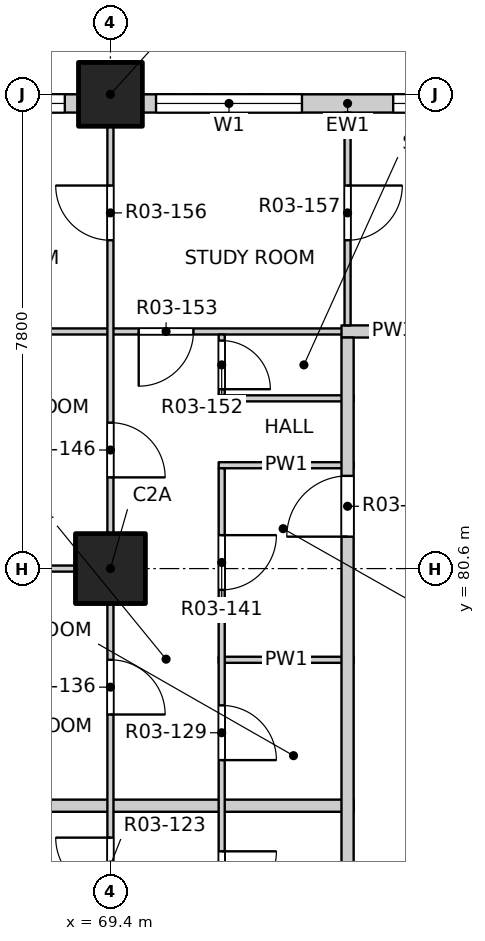
"""IFC4 building model, lengths in metres.
Left out: names, types, materials, properties, quantities, classifications, styles, units other than length and angle.
Written with IfcOpenShell. Run it as: python <this file> out.ifc"""

import sys

from ifc_helpers import new_model, si_unit, direction, frame, frame_2d, origin, origin_2d, place, context, subcontext, project, spatial, rectangle, extrude, element, fill, save


model = new_model("IFC4")
c1 = context("Model", 3, precision=1e-05, world=origin(), true_north=direction((0.0, 1.0)))
c2 = subcontext(c1, "Body", "Model", "MODEL_VIEW")
j1 = project(units=[si_unit("LENGTHUNIT", "METRE"), si_unit("PLANEANGLEUNIT", "RADIAN")], contexts=[c1])
p1 = place(None, origin())
s1 = spatial("IfcSite", under=j1, at=p1, CompositionType="ELEMENT")
p2 = place(p1, origin())
s2 = spatial("IfcBuilding", under=s1, at=p2, CompositionType="ELEMENT")
p3 = place(p2, frame((0.0, 0.0, 43.3)))
s3 = spatial("IfcBuildingStorey", under=s2, at=p3, CompositionType="ELEMENT", Elevation=43.3)
p4 = place(p3, frame((69.4, 88.4, -0.25), z_axis=(0.0, 0.0, 1.0), x_axis=(1.0, 0.0, 0.0)))
e1 = element("IfcColumn", 1, at=p4, inside=s3, PredefinedType="COLUMN", context=c2, shape_type="SweptSolid", body=[
    extrude(rectangle(XDim=1.05, YDim=1.05, at=origin_2d()), origin(), (0.0, 0.0, 1.0), 3.35),
])
p5 = place(p3, frame((69.4, 80.6, -0.25), z_axis=(0.0, 0.0, 1.0), x_axis=(1.0, 0.0, 0.0)))
e2 = element("IfcColumn", 2, at=p5, inside=s3, PredefinedType="COLUMN", context=c2, shape_type="SweptSolid", body=[
    extrude(rectangle(XDim=1.15, YDim=1.15, at=origin_2d()), origin(), (0.0, 0.0, 1.0), 3.35),
])
p6 = place(p3, frame((65.5, 88.25, 0.0), z_axis=(0.0, 0.0, 1.0), x_axis=(1.0, 0.0, 0.0)))
e3 = element("IfcWall", 3, at=p6, inside=s3, PredefinedType="SOLIDWALL", context=c2, shape_type="SweptSolid", body=[
    extrude(rectangle(XDim=3.375, YDim=0.3, at=frame_2d((1.688, 0.0))), origin(), (0.0, 0.0, 1.0), 3.1),
])
p7 = place(p6, frame((0.75, 0.0, 0.9)))
e4 = element("IfcOpeningElement", 4, at=p7, cuts=e3, PredefinedType="OPENING", context=c2, shape_type="SweptSolid", body=[
    extrude(rectangle(XDim=2.4, YDim=1.8, at=frame_2d((1.2, 0.9))), frame((0.0, 0.16, 0.0), z_axis=(0.0, -1.0, 0.0), x_axis=(1.0, 0.0, 0.0)), (0.0, 0.0, 1.0), 0.32),
])
p8 = place(p3, frame((69.925, 88.25, 0.0), z_axis=(0.0, 0.0, 1.0), x_axis=(1.0, 0.0, 0.0)))
e5 = element("IfcWall", 5, at=p8, inside=s3, PredefinedType="SOLIDWALL", context=c2, shape_type="SweptSolid", body=[
    extrude(rectangle(XDim=6.75, YDim=0.3, at=frame_2d((3.375, 0.0))), origin(), (0.0, 0.0, 1.0), 3.1),
])
p9 = place(p8, frame((0.225, 0.0, 0.9)))
e6 = element("IfcOpeningElement", 6, at=p9, cuts=e5, PredefinedType="OPENING", context=c2, shape_type="SweptSolid", body=[
    extrude(rectangle(XDim=2.4, YDim=1.8, at=frame_2d((1.2, 0.9))), frame((0.0, 0.16, 0.0), z_axis=(0.0, -1.0, 0.0), x_axis=(1.0, 0.0, 0.0)), (0.0, 0.0, 1.0), 0.32),
])
p10 = place(p8, frame((4.125, 0.0, 0.9)))
e7 = element("IfcOpeningElement", 7, at=p10, cuts=e5, PredefinedType="OPENING", context=c2, shape_type="SweptSolid", body=[
    extrude(rectangle(XDim=2.4, YDim=1.8, at=frame_2d((1.2, 0.9))), frame((0.0, 0.16, 0.0), z_axis=(0.0, -1.0, 0.0), x_axis=(1.0, 0.0, 0.0)), (0.0, 0.0, 1.0), 0.32),
])
p11 = place(p3, frame((61.9, 76.7, 0.0), z_axis=(0.0, 0.0, 1.0), x_axis=(1.0, 0.0, 0.0)))
e8 = element("IfcWall", 8, at=p11, inside=s3, PredefinedType="PARTITIONING", context=c2, shape_type="SweptSolid", body=[
    extrude(rectangle(XDim=11.5, YDim=0.2, at=frame_2d((5.75, 0.0))), origin(), (0.0, 0.0, 1.0), 3.1),
])
p12 = place(p3, frame((71.18, 79.1, 0.0), z_axis=(0.0, 0.0, 1.0), x_axis=(1.0, 0.0, 0.0)))
e9 = element("IfcWall", 9, at=p12, inside=s3, PredefinedType="PARTITIONING", context=c2, shape_type="SweptSolid", body=[
    extrude(rectangle(XDim=2.22, YDim=0.1, at=frame_2d((1.11, 0.0))), origin(), (0.0, 0.0, 1.0), 3.1),
])
p13 = place(p3, frame((61.9, 80.6, 0.0), z_axis=(0.0, 0.0, 1.0), x_axis=(1.0, 0.0, 0.0)))
e10 = element("IfcWall", 10, at=p13, inside=s3, PredefinedType="PARTITIONING", context=c2, shape_type="SweptSolid", body=[
    extrude(rectangle(XDim=7.55, YDim=0.1, at=frame_2d((3.775, 0.0))), origin(), (0.0, 0.0, 1.0), 3.1),
])
for number, where, z_axis, x_axis in (
    (11, (71.18, 82.3, 0.0), (0.0, 0.0, 1.0), (1.0, 0.0, 0.0)),
    (12, (71.18, 83.4, 0.0), (0.0, 0.0, 1.0), (1.0, 0.0, 0.0)),
):
    element("IfcWall", number, at=place(p3, frame(where, z_axis=z_axis, x_axis=x_axis)), inside=s3, PredefinedType="PARTITIONING", context=c2, shape_type="SweptSolid", body=[
        extrude(rectangle(XDim=2.22, YDim=0.1, at=frame_2d((1.11, 0.0))), origin(), (0.0, 0.0, 1.0), 3.1),
    ])
p14 = place(p3, frame((61.9, 84.5, 0.0), z_axis=(0.0, 0.0, 1.0), x_axis=(1.0, 0.0, 0.0)))
e13 = element("IfcWall", 13, at=p14, inside=s3, PredefinedType="PARTITIONING", context=c2, shape_type="SweptSolid", body=[
    extrude(rectangle(XDim=11.5, YDim=0.1, at=frame_2d((5.75, 0.0))), origin(), (0.0, 0.0, 1.0), 3.1),
])
p15 = place(p14, frame((7.965, 0.0, 0.0)))
e14 = element("IfcOpeningElement", 14, at=p15, cuts=e13, PredefinedType="OPENING", context=c2, shape_type="SweptSolid", body=[
    extrude(rectangle(XDim=0.9, YDim=2.1, at=frame_2d((0.45, 1.05))), frame((0.0, 0.06, 0.0), z_axis=(0.0, -1.0, 0.0), x_axis=(1.0, 0.0, 0.0)), (0.0, 0.0, 1.0), 0.12),
])
p16 = place(p3, frame((73.2, 84.5, 0.0), z_axis=(0.0, 0.0, 1.0), x_axis=(1.0, 0.0, 0.0)))
e15 = element("IfcWall", 15, at=p16, inside=s3, PredefinedType="PARTITIONING", context=c2, shape_type="SweptSolid", body=[
    extrude(rectangle(XDim=1.7, YDim=0.2, at=frame_2d((0.85, 0.0))), origin(), (0.0, 0.0, 1.0), 3.1),
])
p17 = place(p3, frame((69.4, 41.9, 0.0), z_axis=(0.0, 0.0, 1.0), x_axis=(0.0, 1.0, 0.0)))
e16 = element("IfcWall", 16, at=p17, inside=s3, PredefinedType="PARTITIONING", context=c2, shape_type="SweptSolid", body=[
    extrude(rectangle(XDim=46.2, YDim=0.1, at=frame_2d((23.1, 0.0))), origin(), (0.0, 0.0, 1.0), 3.1),
])
p18 = place(p17, frame((1.2, 0.0, 0.0)))
e17 = element("IfcOpeningElement", 17, at=p18, cuts=e16, PredefinedType="OPENING", context=c2, shape_type="SweptSolid", body=[
    extrude(rectangle(XDim=0.9, YDim=2.1, at=frame_2d((0.45, 1.05))), frame((0.0, 0.06, 0.0), z_axis=(0.0, -1.0, 0.0), x_axis=(1.0, 0.0, 0.0)), (0.0, 0.0, 1.0), 0.12),
])
p19 = place(p17, frame((5.9, 0.0, 0.0)))
e18 = element("IfcOpeningElement", 18, at=p19, cuts=e16, PredefinedType="OPENING", context=c2, shape_type="SweptSolid", body=[
    extrude(rectangle(XDim=0.9, YDim=2.1, at=frame_2d((0.45, 1.05))), frame((0.0, 0.06, 0.0), z_axis=(0.0, -1.0, 0.0), x_axis=(1.0, 0.0, 0.0)), (0.0, 0.0, 1.0), 0.12),
])
p20 = place(p17, frame((9.0, 0.0, 0.0)))
e19 = element("IfcOpeningElement", 19, at=p20, cuts=e16, PredefinedType="OPENING", context=c2, shape_type="SweptSolid", body=[
    extrude(rectangle(XDim=0.9, YDim=2.1, at=frame_2d((0.45, 1.05))), frame((0.0, 0.06, 0.0), z_axis=(0.0, -1.0, 0.0), x_axis=(1.0, 0.0, 0.0)), (0.0, 0.0, 1.0), 0.12),
])
p21 = place(p17, frame((13.725, 0.0, 0.0)))
e20 = element("IfcOpeningElement", 20, at=p21, cuts=e16, PredefinedType="OPENING", context=c2, shape_type="SweptSolid", body=[
    extrude(rectangle(XDim=0.9, YDim=2.1, at=frame_2d((0.45, 1.05))), frame((0.0, 0.06, 0.0), z_axis=(0.0, -1.0, 0.0), x_axis=(1.0, 0.0, 0.0)), (0.0, 0.0, 1.0), 0.12),
])
p22 = place(p17, frame((17.775, 0.0, 0.0)))
e21 = element("IfcOpeningElement", 21, at=p22, cuts=e16, PredefinedType="OPENING", context=c2, shape_type="SweptSolid", body=[
    extrude(rectangle(XDim=0.9, YDim=2.1, at=frame_2d((0.45, 1.05))), frame((0.0, 0.06, 0.0), z_axis=(0.0, -1.0, 0.0), x_axis=(1.0, 0.0, 0.0)), (0.0, 0.0, 1.0), 0.12),
])
p23 = place(p17, frame((20.7, 0.0, 0.0)))
e22 = element("IfcOpeningElement", 22, at=p23, cuts=e16, PredefinedType="OPENING", context=c2, shape_type="SweptSolid", body=[
    extrude(rectangle(XDim=0.9, YDim=2.1, at=frame_2d((0.45, 1.05))), frame((0.0, 0.06, 0.0), z_axis=(0.0, -1.0, 0.0), x_axis=(1.0, 0.0, 0.0)), (0.0, 0.0, 1.0), 0.12),
])
p24 = place(p17, frame((25.575, 0.0, 0.0)))
e23 = element("IfcOpeningElement", 23, at=p24, cuts=e16, PredefinedType="OPENING", context=c2, shape_type="SweptSolid", body=[
    extrude(rectangle(XDim=0.9, YDim=2.1, at=frame_2d((0.45, 1.05))), frame((0.0, 0.06, 0.0), z_axis=(0.0, -1.0, 0.0), x_axis=(1.0, 0.0, 0.0)), (0.0, 0.0, 1.0), 0.12),
])
p25 = place(p17, frame((28.5, 0.0, 0.0)))
e24 = element("IfcOpeningElement", 24, at=p25, cuts=e16, PredefinedType="OPENING", context=c2, shape_type="SweptSolid", body=[
    extrude(rectangle(XDim=0.9, YDim=2.1, at=frame_2d((0.45, 1.05))), frame((0.0, 0.06, 0.0), z_axis=(0.0, -1.0, 0.0), x_axis=(1.0, 0.0, 0.0)), (0.0, 0.0, 1.0), 0.12),
])
p26 = place(p17, frame((33.375, 0.0, 0.0)))
e25 = element("IfcOpeningElement", 25, at=p26, cuts=e16, PredefinedType="OPENING", context=c2, shape_type="SweptSolid", body=[
    extrude(rectangle(XDim=0.9, YDim=2.1, at=frame_2d((0.45, 1.05))), frame((0.0, 0.06, 0.0), z_axis=(0.0, -1.0, 0.0), x_axis=(1.0, 0.0, 0.0)), (0.0, 0.0, 1.0), 0.12),
])
p27 = place(p17, frame((36.3, 0.0, 0.0)))
e26 = element("IfcOpeningElement", 26, at=p27, cuts=e16, PredefinedType="OPENING", context=c2, shape_type="SweptSolid", body=[
    extrude(rectangle(XDim=0.9, YDim=2.1, at=frame_2d((0.45, 1.05))), frame((0.0, 0.06, 0.0), z_axis=(0.0, -1.0, 0.0), x_axis=(1.0, 0.0, 0.0)), (0.0, 0.0, 1.0), 0.12),
])
p28 = place(p17, frame((40.2, 0.0, 0.0)))
e27 = element("IfcOpeningElement", 27, at=p28, cuts=e16, PredefinedType="OPENING", context=c2, shape_type="SweptSolid", body=[
    extrude(rectangle(XDim=0.9, YDim=2.1, at=frame_2d((0.45, 1.05))), frame((0.0, 0.06, 0.0), z_axis=(0.0, -1.0, 0.0), x_axis=(1.0, 0.0, 0.0)), (0.0, 0.0, 1.0), 0.12),
])
p29 = place(p17, frame((44.1, 0.0, 0.0)))
e28 = element("IfcOpeningElement", 28, at=p29, cuts=e16, PredefinedType="OPENING", context=c2, shape_type="SweptSolid", body=[
    extrude(rectangle(XDim=0.9, YDim=2.1, at=frame_2d((0.45, 1.05))), frame((0.0, 0.06, 0.0), z_axis=(0.0, -1.0, 0.0), x_axis=(1.0, 0.0, 0.0)), (0.0, 0.0, 1.0), 0.12),
])
p30 = place(p3, frame((71.23, 71.3, 0.0), z_axis=(0.0, 0.0, 1.0), x_axis=(0.0, 1.0, 0.0)))
e29 = element("IfcWall", 29, at=p30, inside=s3, PredefinedType="PARTITIONING", context=c2, shape_type="SweptSolid", body=[
    extrude(rectangle(XDim=10.95, YDim=0.1, at=frame_2d((5.475, 0.0))), origin(), (0.0, 0.0, 1.0), 3.1),
])
p31 = place(p30, frame((1.025, 0.0, 0.0)))
e30 = element("IfcOpeningElement", 30, at=p31, cuts=e29, PredefinedType="OPENING", context=c2, shape_type="SweptSolid", body=[
    extrude(rectangle(XDim=0.9, YDim=2.1, at=frame_2d((0.45, 1.05))), frame((0.0, 0.06, 0.0), z_axis=(0.0, -1.0, 0.0), x_axis=(1.0, 0.0, 0.0)), (0.0, 0.0, 1.0), 0.12),
])
p32 = place(p30, frame((3.75, 0.0, 0.0)))
e31 = element("IfcOpeningElement", 31, at=p32, cuts=e29, PredefinedType="OPENING", context=c2, shape_type="SweptSolid", body=[
    extrude(rectangle(XDim=0.9, YDim=2.1, at=frame_2d((0.45, 1.05))), frame((0.0, 0.06, 0.0), z_axis=(0.0, -1.0, 0.0), x_axis=(1.0, 0.0, 0.0)), (0.0, 0.0, 1.0), 0.12),
])
p33 = place(p30, frame((6.15, 0.0, 0.0)))
e32 = element("IfcOpeningElement", 32, at=p33, cuts=e29, PredefinedType="OPENING", context=c2, shape_type="SweptSolid", body=[
    extrude(rectangle(XDim=0.9, YDim=2.1, at=frame_2d((0.45, 1.05))), frame((0.0, 0.06, 0.0), z_axis=(0.0, -1.0, 0.0), x_axis=(1.0, 0.0, 0.0)), (0.0, 0.0, 1.0), 0.12),
])
p34 = place(p30, frame((8.95, 0.0, 0.0)))
e33 = element("IfcOpeningElement", 33, at=p34, cuts=e29, PredefinedType="OPENING", context=c2, shape_type="SweptSolid", body=[
    extrude(rectangle(XDim=0.9, YDim=2.1, at=frame_2d((0.45, 1.05))), frame((0.0, 0.06, 0.0), z_axis=(0.0, -1.0, 0.0), x_axis=(1.0, 0.0, 0.0)), (0.0, 0.0, 1.0), 0.12),
])
p35 = place(p3, frame((71.23, 83.45, 0.0), z_axis=(0.0, 0.0, 1.0), x_axis=(0.0, 1.0, 0.0)))
e34 = element("IfcWall", 34, at=p35, inside=s3, PredefinedType="PARTITIONING", context=c2, shape_type="SweptSolid", body=[
    extrude(rectangle(XDim=1.0, YDim=0.1, at=frame_2d((0.5, 0.0))), origin(), (0.0, 0.0, 1.0), 3.1),
])
p36 = place(p35, frame((0.1, 0.0, 0.0)))
e35 = element("IfcOpeningElement", 35, at=p36, cuts=e34, PredefinedType="OPENING", context=c2, shape_type="SweptSolid", body=[
    extrude(rectangle(XDim=0.8, YDim=2.1, at=frame_2d((0.4, 1.05))), frame((0.0, 0.06, 0.0), z_axis=(0.0, -1.0, 0.0), x_axis=(1.0, 0.0, 0.0)), (0.0, 0.0, 1.0), 0.12),
])
p37 = place(p3, frame((73.3, 53.4, 0.0), z_axis=(0.0, 0.0, 1.0), x_axis=(0.0, 1.0, 0.0)))
e36 = element("IfcWall", 36, at=p37, inside=s3, PredefinedType="PARTITIONING", context=c2, shape_type="SweptSolid", body=[
    extrude(rectangle(XDim=31.0, YDim=0.2, at=frame_2d((15.5, 0.0))), origin(), (0.0, 0.0, 1.0), 3.1),
])
p38 = place(p37, frame((5.775, 0.0, 0.0)))
e37 = element("IfcOpeningElement", 37, at=p38, cuts=e36, PredefinedType="OPENING", context=c2, shape_type="SweptSolid", body=[
    extrude(rectangle(XDim=1.0, YDim=2.1, at=frame_2d((0.5, 1.05))), frame((0.0, 0.11, 0.0), z_axis=(0.0, -1.0, 0.0), x_axis=(1.0, 0.0, 0.0)), (0.0, 0.0, 1.0), 0.22),
])
p39 = place(p37, frame((10.875, 0.0, 0.0)))
e38 = element("IfcOpeningElement", 38, at=p39, cuts=e36, PredefinedType="OPENING", context=c2, shape_type="SweptSolid", body=[
    extrude(rectangle(XDim=1.0, YDim=2.1, at=frame_2d((0.5, 1.05))), frame((0.0, 0.11, 0.0), z_axis=(0.0, -1.0, 0.0), x_axis=(1.0, 0.0, 0.0)), (0.0, 0.0, 1.0), 0.22),
])
p40 = place(p37, frame((18.025, 0.0, 0.0)))
e39 = element("IfcOpeningElement", 39, at=p40, cuts=e36, PredefinedType="OPENING", context=c2, shape_type="SweptSolid", body=[
    extrude(rectangle(XDim=1.0, YDim=2.1, at=frame_2d((0.5, 1.05))), frame((0.0, 0.11, 0.0), z_axis=(0.0, -1.0, 0.0), x_axis=(1.0, 0.0, 0.0)), (0.0, 0.0, 1.0), 0.22),
])
p41 = place(p37, frame((27.725, 0.0, 0.0)))
e40 = element("IfcOpeningElement", 40, at=p41, cuts=e36, PredefinedType="OPENING", context=c2, shape_type="SweptSolid", body=[
    extrude(rectangle(XDim=1.0, YDim=2.1, at=frame_2d((0.5, 1.05))), frame((0.0, 0.11, 0.0), z_axis=(0.0, -1.0, 0.0), x_axis=(1.0, 0.0, 0.0)), (0.0, 0.0, 1.0), 0.22),
])
p42 = place(p3, frame((73.3, 84.6, 0.0), z_axis=(0.0, 0.0, 1.0), x_axis=(0.0, 1.0, 0.0)))
e41 = element("IfcWall", 41, at=p42, inside=s3, PredefinedType="PARTITIONING", context=c2, shape_type="SweptSolid", body=[
    extrude(rectangle(XDim=3.5, YDim=0.1, at=frame_2d((1.75, 0.0))), origin(), (0.0, 0.0, 1.0), 3.1),
])
p43 = place(p42, frame((1.4, 0.0, 0.0)))
e42 = element("IfcOpeningElement", 42, at=p43, cuts=e41, PredefinedType="OPENING", context=c2, shape_type="SweptSolid", body=[
    extrude(rectangle(XDim=0.9, YDim=2.1, at=frame_2d((0.45, 1.05))), frame((0.0, 0.06, 0.0), z_axis=(0.0, -1.0, 0.0), x_axis=(1.0, 0.0, 0.0)), (0.0, 0.0, 1.0), 0.12),
])
p44 = place(p7, origin())
e43 = element("IfcWindow", 43, at=p44, inside=s3, PartitioningType="DOUBLE_PANEL_VERTICAL", PredefinedType="WINDOW", context=c2, shape_type="SweptSolid", body=[
    extrude(rectangle(XDim=2.4, YDim=1.8, at=frame_2d((1.2, 0.9))), frame((0.0, 0.03, 0.0), z_axis=(0.0, -1.0, 0.0), x_axis=(1.0, 0.0, 0.0)), (0.0, 0.0, 1.0), 0.06),
])
fill(e4, e43)
p45 = place(p9, origin())
e44 = element("IfcWindow", 44, at=p45, inside=s3, PartitioningType="DOUBLE_PANEL_VERTICAL", PredefinedType="WINDOW", context=c2, shape_type="SweptSolid", body=[
    extrude(rectangle(XDim=2.4, YDim=1.8, at=frame_2d((1.2, 0.9))), frame((0.0, 0.03, 0.0), z_axis=(0.0, -1.0, 0.0), x_axis=(1.0, 0.0, 0.0)), (0.0, 0.0, 1.0), 0.06),
])
fill(e6, e44)
p46 = place(p10, origin())
e45 = element("IfcWindow", 45, at=p46, inside=s3, PartitioningType="DOUBLE_PANEL_VERTICAL", PredefinedType="WINDOW", context=c2, shape_type="SweptSolid", body=[
    extrude(rectangle(XDim=2.4, YDim=1.8, at=frame_2d((1.2, 0.9))), frame((0.0, 0.03, 0.0), z_axis=(0.0, -1.0, 0.0), x_axis=(1.0, 0.0, 0.0)), (0.0, 0.0, 1.0), 0.06),
])
fill(e7, e45)
p47 = place(p32, origin())
e46 = element("IfcDoor", 46, at=p47, inside=s3, OperationType="SINGLE_SWING_LEFT", PredefinedType="DOOR", context=c2, shape_type="SweptSolid", body=[
    extrude(rectangle(XDim=0.9, YDim=2.1, at=frame_2d((0.45, 1.05))), frame((0.0, 0.025, 0.0), z_axis=(0.0, -1.0, 0.0), x_axis=(1.0, 0.0, 0.0)), (0.0, 0.0, 1.0), 0.05),
])
fill(e31, e46)
p48 = place(p26, origin())
e47 = element("IfcDoor", 47, at=p48, inside=s3, OperationType="SINGLE_SWING_RIGHT", PredefinedType="DOOR", context=c2, shape_type="SweptSolid", body=[
    extrude(rectangle(XDim=0.9, YDim=2.1, at=frame_2d((0.45, 1.05))), frame((0.0, 0.025, 0.0), z_axis=(0.0, -1.0, 0.0), x_axis=(1.0, 0.0, 0.0)), (0.0, 0.0, 1.0), 0.05),
])
fill(e25, e47)
p49 = place(p33, origin())
e48 = element("IfcDoor", 48, at=p49, inside=s3, OperationType="SINGLE_SWING_RIGHT", PredefinedType="DOOR", context=c2, shape_type="SweptSolid", body=[
    extrude(rectangle(XDim=0.9, YDim=2.1, at=frame_2d((0.45, 1.05))), frame((0.0, 0.025, 0.0), z_axis=(0.0, -1.0, 0.0), x_axis=(1.0, 0.0, 0.0)), (0.0, 0.0, 1.0), 0.05),
])
fill(e32, e48)
p50 = place(p27, origin())
e49 = element("IfcDoor", 49, at=p50, inside=s3, OperationType="SINGLE_SWING_RIGHT", PredefinedType="DOOR", context=c2, shape_type="SweptSolid", body=[
    extrude(rectangle(XDim=0.9, YDim=2.1, at=frame_2d((0.45, 1.05))), frame((0.0, 0.025, 0.0), z_axis=(0.0, -1.0, 0.0), x_axis=(1.0, 0.0, 0.0)), (0.0, 0.0, 1.0), 0.05),
])
fill(e26, e49)
p51 = place(p34, origin())
e50 = element("IfcDoor", 50, at=p51, inside=s3, OperationType="SINGLE_SWING_LEFT", PredefinedType="DOOR", context=c2, shape_type="SweptSolid", body=[
    extrude(rectangle(XDim=0.9, YDim=2.1, at=frame_2d((0.45, 1.05))), frame((0.0, 0.025, 0.0), z_axis=(0.0, -1.0, 0.0), x_axis=(1.0, 0.0, 0.0)), (0.0, 0.0, 1.0), 0.05),
])
fill(e33, e50)
p52 = place(p41, origin())
e51 = element("IfcDoor", 51, at=p52, inside=s3, OperationType="SINGLE_SWING_LEFT", PredefinedType="DOOR", context=c2, shape_type="SweptSolid", body=[
    extrude(rectangle(XDim=1.0, YDim=2.1, at=frame_2d((0.5, 1.05))), frame((0.0, 0.025, 0.0), z_axis=(0.0, -1.0, 0.0), x_axis=(1.0, 0.0, 0.0)), (0.0, 0.0, 1.0), 0.05),
])
fill(e40, e51)
p53 = place(p28, origin())
e52 = element("IfcDoor", 52, at=p53, inside=s3, OperationType="SINGLE_SWING_RIGHT", PredefinedType="DOOR", context=c2, shape_type="SweptSolid", body=[
    extrude(rectangle(XDim=0.9, YDim=2.1, at=frame_2d((0.45, 1.05))), frame((0.0, 0.025, 0.0), z_axis=(0.0, -1.0, 0.0), x_axis=(1.0, 0.0, 0.0)), (0.0, 0.0, 1.0), 0.05),
])
fill(e27, e52)
p54 = place(p36, origin())
e53 = element("IfcDoor", 53, at=p54, inside=s3, OperationType="SINGLE_SWING_RIGHT", PredefinedType="DOOR", context=c2, shape_type="SweptSolid", body=[
    extrude(rectangle(XDim=0.8, YDim=2.1, at=frame_2d((0.4, 1.05))), frame((0.0, 0.025, 0.0), z_axis=(0.0, -1.0, 0.0), x_axis=(1.0, 0.0, 0.0)), (0.0, 0.0, 1.0), 0.05),
])
fill(e35, e53)
p55 = place(p15, origin())
e54 = element("IfcDoor", 54, at=p55, inside=s3, OperationType="SINGLE_SWING_RIGHT", PredefinedType="DOOR", context=c2, shape_type="SweptSolid", body=[
    extrude(rectangle(XDim=0.9, YDim=2.1, at=frame_2d((0.45, 1.05))), frame((0.0, 0.025, 0.0), z_axis=(0.0, -1.0, 0.0), x_axis=(1.0, 0.0, 0.0)), (0.0, 0.0, 1.0), 0.05),
])
fill(e14, e54)
p56 = place(p29, origin())
e55 = element("IfcDoor", 55, at=p56, inside=s3, OperationType="SINGLE_SWING_RIGHT", PredefinedType="DOOR", context=c2, shape_type="SweptSolid", body=[
    extrude(rectangle(XDim=0.9, YDim=2.1, at=frame_2d((0.45, 1.05))), frame((0.0, 0.025, 0.0), z_axis=(0.0, -1.0, 0.0), x_axis=(1.0, 0.0, 0.0)), (0.0, 0.0, 1.0), 0.05),
])
fill(e28, e55)
p57 = place(p43, origin())
e56 = element("IfcDoor", 56, at=p57, inside=s3, OperationType="SINGLE_SWING_LEFT", PredefinedType="DOOR", context=c2, shape_type="SweptSolid", body=[
    extrude(rectangle(XDim=0.9, YDim=2.1, at=frame_2d((0.45, 1.05))), frame((0.0, 0.025, 0.0), z_axis=(0.0, -1.0, 0.0), x_axis=(1.0, 0.0, 0.0)), (0.0, 0.0, 1.0), 0.05),
])
fill(e42, e56)
save(model, sys.argv[1])
